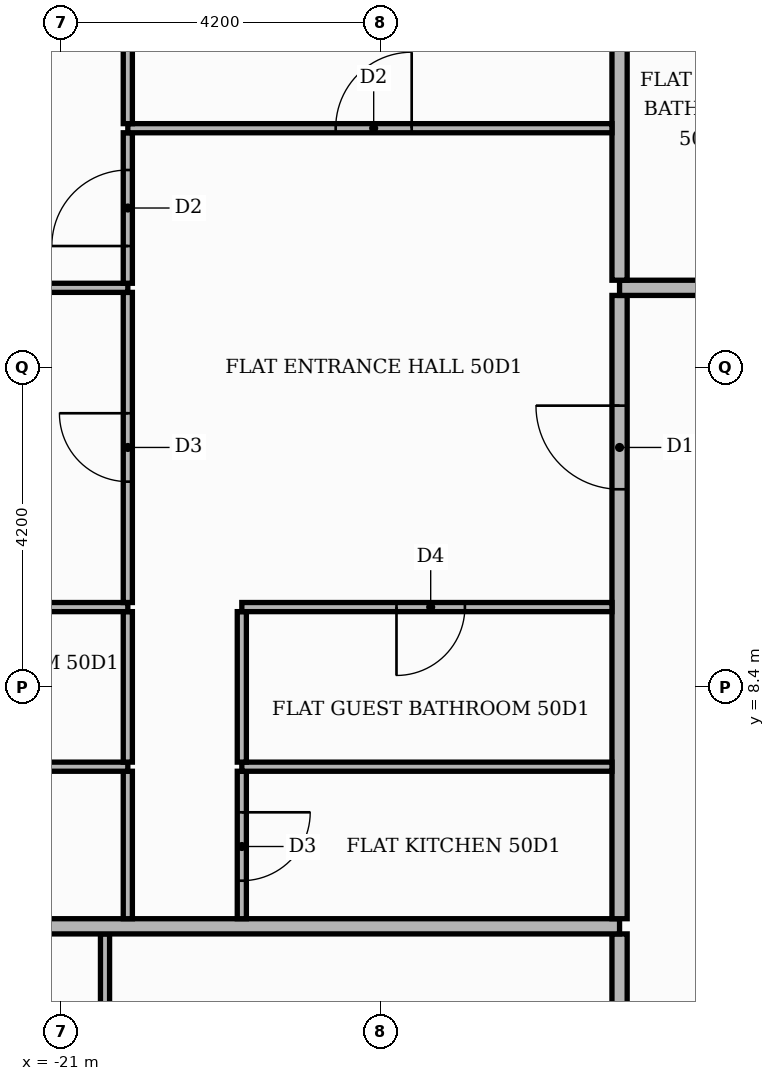
"""IFC4 building model, lengths in metres.
Left out: names, types, materials, properties, quantities, classifications, styles, units other than length and angle.
Written with IfcOpenShell. Run it as: python <this file> out.ifc"""

import sys

from ifc_helpers import new_model, si_unit, direction, frame, frame_2d, origin, place, context, subcontext, project, spatial, rectangle, extrude, element, fill, save


model = new_model("IFC4")
c1 = context("Model", 3, precision=1e-05, world=origin(), true_north=direction((0.0, 1.0)))
c2 = subcontext(c1, "Body", "Model", "MODEL_VIEW")
j1 = project(units=[si_unit("LENGTHUNIT", "METRE"), si_unit("PLANEANGLEUNIT", "RADIAN")], contexts=[c1])
p1 = place(None, origin())
s1 = spatial("IfcSite", under=j1, at=p1, CompositionType="ELEMENT")
p2 = place(p1, origin())
s2 = spatial("IfcBuilding", under=s1, at=p2, CompositionType="ELEMENT")
p3 = place(p2, frame((0.0, 0.0, 211.8)))
s3 = spatial("IfcBuildingStorey", under=s2, at=p3, CompositionType="ELEMENT", Elevation=211.8)
p4 = place(p3, frame((-13.65, -13.55, 0.0), z_axis=(0.0, 0.0, 1.0), x_axis=(0.0, 1.0, 0.0)))
e1 = element("IfcWall", 1, at=p4, inside=s3, PredefinedType="PARTITIONING", context=c2, shape_type="SweptSolid", body=[
    extrude(rectangle(XDim=18.7, YDim=0.2, at=frame_2d((9.35, 0.0))), origin(), (0.0, 0.0, 1.0), 3.48),
])
p5 = place(p4, frame((16.15, 0.0, 0.0)))
e2 = element("IfcOpeningElement", 2, at=p5, cuts=e1, PredefinedType="OPENING", context=c2, shape_type="SweptSolid", body=[
    extrude(rectangle(XDim=1.1, YDim=2.4, at=frame_2d((0.55, 1.2))), frame((0.0, 0.11, 0.0), z_axis=(0.0, -1.0, 0.0), x_axis=(1.0, 0.0, 0.0)), (0.0, 0.0, 1.0), 0.22),
])
p6 = place(p3, frame((-20.42, 1.11, 0.0), z_axis=(0.0, 0.0, 1.0), x_axis=(0.0, 1.0, 0.0)))
e3 = element("IfcWall", 3, at=p6, inside=s3, PredefinedType="PARTITIONING", context=c2, shape_type="SweptSolid", body=[
    extrude(rectangle(XDim=4.04, YDim=0.12, at=frame_2d((2.02, 0.0))), origin(), (0.0, 0.0, 1.0), 3.48),
])
p7 = place(p6, frame((1.54, 0.0, 0.0)))
e4 = element("IfcOpeningElement", 4, at=p7, cuts=e3, PredefinedType="OPENING", context=c2, shape_type="SweptSolid", body=[
    extrude(rectangle(XDim=1.0, YDim=2.1, at=frame_2d((0.5, 1.05))), frame((0.0, 0.07, 0.0), z_axis=(0.0, -1.0, 0.0), x_axis=(1.0, 0.0, 0.0)), (0.0, 0.0, 1.0), 0.14),
])
p8 = place(p3, frame((-25.42, 5.25, 0.0), z_axis=(0.0, 0.0, 1.0), x_axis=(1.0, 0.0, 0.0)))
e5 = element("IfcWall", 5, at=p8, inside=s3, PredefinedType="PARTITIONING", context=c2, shape_type="SweptSolid", body=[
    extrude(rectangle(XDim=11.77, YDim=0.2, at=frame_2d((5.885, 0.0))), origin(), (0.0, 0.0, 1.0), 3.48),
])
p9 = place(p3, frame((-20.12, 5.35, 0.0), z_axis=(0.0, 0.0, 1.0), x_axis=(0.0, 1.0, 0.0)))
e6 = element("IfcWall", 6, at=p9, inside=s3, PredefinedType="PARTITIONING", context=c2, shape_type="SweptSolid", body=[
    extrude(rectangle(XDim=1.94, YDim=0.12, at=frame_2d((0.97, 0.0))), origin(), (0.0, 0.0, 1.0), 3.48),
])
p10 = place(p3, frame((-18.62, 5.35, 0.0), z_axis=(0.0, 0.0, 1.0), x_axis=(0.0, 1.0, 0.0)))
e7 = element("IfcWall", 7, at=p10, inside=s3, PredefinedType="PARTITIONING", context=c2, shape_type="SweptSolid", body=[
    extrude(rectangle(XDim=1.94, YDim=0.12, at=frame_2d((0.97, 0.0))), origin(), (0.0, 0.0, 1.0), 3.48),
])
p11 = place(p10, frame((0.5, 0.0, 0.0)))
e8 = element("IfcOpeningElement", 8, at=p11, cuts=e7, PredefinedType="OPENING", context=c2, shape_type="SweptSolid", body=[
    extrude(rectangle(XDim=0.9, YDim=2.1, at=frame_2d((0.45, 1.05))), frame((0.0, 0.07, 0.0), z_axis=(0.0, -1.0, 0.0), x_axis=(1.0, 0.0, 0.0)), (0.0, 0.0, 1.0), 0.14),
])
p12 = place(p3, frame((-13.65, 5.35, 0.0), z_axis=(0.0, 0.0, 1.0), x_axis=(0.0, 1.0, 0.0)))
e9 = element("IfcWall", 9, at=p12, inside=s3, PredefinedType="PARTITIONING", context=c2, shape_type="SweptSolid", body=[
    extrude(rectangle(XDim=8.2, YDim=0.2, at=frame_2d((4.1, 0.0))), origin(), (0.0, 0.0, 1.0), 3.48),
])
p13 = place(p12, frame((5.65, 0.0, 0.0)))
e10 = element("IfcOpeningElement", 10, at=p13, cuts=e9, PredefinedType="OPENING", context=c2, shape_type="SweptSolid", body=[
    extrude(rectangle(XDim=1.1, YDim=2.4, at=frame_2d((0.55, 1.2))), frame((0.0, 0.11, 0.0), z_axis=(0.0, -1.0, 0.0), x_axis=(1.0, 0.0, 0.0)), (0.0, 0.0, 1.0), 0.22),
])
p14 = place(p3, frame((-25.42, 7.35, 0.0), z_axis=(0.0, 0.0, 1.0), x_axis=(1.0, 0.0, 0.0)))
e11 = element("IfcWall", 11, at=p14, inside=s3, PredefinedType="PARTITIONING", context=c2, shape_type="SweptSolid", body=[
    extrude(rectangle(XDim=5.3, YDim=0.12, at=frame_2d((2.65, 0.0))), origin(), (0.0, 0.0, 1.0), 3.48),
])
p15 = place(p14, frame((2.05, 0.0, 0.0)))
e12 = element("IfcOpeningElement", 12, at=p15, cuts=e11, PredefinedType="OPENING", context=c2, shape_type="SweptSolid", body=[
    extrude(rectangle(XDim=0.9, YDim=2.1, at=frame_2d((0.45, 1.05))), frame((0.0, 0.07, 0.0), z_axis=(0.0, -1.0, 0.0), x_axis=(1.0, 0.0, 0.0)), (0.0, 0.0, 1.0), 0.14),
])
p16 = place(p3, frame((-18.62, 7.35, 0.0), z_axis=(0.0, 0.0, 1.0), x_axis=(1.0, 0.0, 0.0)))
e13 = element("IfcWall", 13, at=p16, inside=s3, PredefinedType="PARTITIONING", context=c2, shape_type="SweptSolid", body=[
    extrude(rectangle(XDim=4.87, YDim=0.12, at=frame_2d((2.435, 0.0))), origin(), (0.0, 0.0, 1.0), 3.48),
])
for number, where, z_axis, x_axis in (
    (14, (-20.12, 7.41, 0.0), (0.0, 0.0, 1.0), (0.0, 1.0, 0.0)),
    (15, (-18.62, 7.41, 0.0), (0.0, 0.0, 1.0), (0.0, 1.0, 0.0)),
):
    element("IfcWall", number, at=place(p3, frame(where, z_axis=z_axis, x_axis=x_axis)), inside=s3, PredefinedType="PARTITIONING", context=c2, shape_type="SweptSolid", body=[
        extrude(rectangle(XDim=1.98, YDim=0.12, at=frame_2d((0.99, 0.0))), origin(), (0.0, 0.0, 1.0), 3.48),
    ])
p17 = place(p3, frame((-25.42, 9.45, 0.0), z_axis=(0.0, 0.0, 1.0), x_axis=(1.0, 0.0, 0.0)))
e16 = element("IfcWall", 16, at=p17, inside=s3, PredefinedType="PARTITIONING", context=c2, shape_type="SweptSolid", body=[
    extrude(rectangle(XDim=5.3, YDim=0.12, at=frame_2d((2.65, 0.0))), origin(), (0.0, 0.0, 1.0), 3.48),
])
p18 = place(p17, frame((2.05, 0.0, 0.0)))
e17 = element("IfcOpeningElement", 17, at=p18, cuts=e16, PredefinedType="OPENING", context=c2, shape_type="SweptSolid", body=[
    extrude(rectangle(XDim=0.9, YDim=2.1, at=frame_2d((0.45, 1.05))), frame((0.0, 0.07, 0.0), z_axis=(0.0, -1.0, 0.0), x_axis=(1.0, 0.0, 0.0)), (0.0, 0.0, 1.0), 0.14),
])
p19 = place(p3, frame((-18.62, 9.45, 0.0), z_axis=(0.0, 0.0, 1.0), x_axis=(1.0, 0.0, 0.0)))
e18 = element("IfcWall", 18, at=p19, inside=s3, PredefinedType="PARTITIONING", context=c2, shape_type="SweptSolid", body=[
    extrude(rectangle(XDim=4.87, YDim=0.12, at=frame_2d((2.435, 0.0))), origin(), (0.0, 0.0, 1.0), 3.48),
])
p20 = place(p19, frame((2.035, 0.0, 0.0)))
e19 = element("IfcOpeningElement", 19, at=p20, cuts=e18, PredefinedType="OPENING", context=c2, shape_type="SweptSolid", body=[
    extrude(rectangle(XDim=0.9, YDim=2.1, at=frame_2d((0.45, 1.05))), frame((0.0, 0.07, 0.0), z_axis=(0.0, -1.0, 0.0), x_axis=(1.0, 0.0, 0.0)), (0.0, 0.0, 1.0), 0.14),
])
p21 = place(p3, frame((-20.12, 9.51, 0.0), z_axis=(0.0, 0.0, 1.0), x_axis=(0.0, 1.0, 0.0)))
e20 = element("IfcWall", 20, at=p21, inside=s3, PredefinedType="PARTITIONING", context=c2, shape_type="SweptSolid", body=[
    extrude(rectangle(XDim=4.08, YDim=0.12, at=frame_2d((2.04, 0.0))), origin(), (0.0, 0.0, 1.0), 3.48),
])
p22 = place(p21, frame((1.59, 0.0, 0.0)))
e21 = element("IfcOpeningElement", 21, at=p22, cuts=e20, PredefinedType="OPENING", context=c2, shape_type="SweptSolid", body=[
    extrude(rectangle(XDim=0.9, YDim=2.1, at=frame_2d((0.45, 1.05))), frame((0.0, 0.07, 0.0), z_axis=(0.0, -1.0, 0.0), x_axis=(1.0, 0.0, 0.0)), (0.0, 0.0, 1.0), 0.14),
])
p23 = place(p3, frame((-25.42, 13.65, 0.0), z_axis=(0.0, 0.0, 1.0), x_axis=(1.0, 0.0, 0.0)))
e22 = element("IfcWall", 22, at=p23, inside=s3, PredefinedType="PARTITIONING", context=c2, shape_type="SweptSolid", body=[
    extrude(rectangle(XDim=5.3, YDim=0.12, at=frame_2d((2.65, 0.0))), origin(), (0.0, 0.0, 1.0), 3.48),
])
p24 = place(p3, frame((-13.65, 13.65, 0.0), z_axis=(0.0, 0.0, 1.0), x_axis=(1.0, 0.0, 0.0)))
e23 = element("IfcWall", 23, at=p24, inside=s3, PredefinedType="PARTITIONING", context=c2, shape_type="SweptSolid", body=[
    extrude(rectangle(XDim=39.07, YDim=0.2, at=frame_2d((19.535, 0.0))), origin(), (0.0, 0.0, 1.0), 3.48),
])
p25 = place(p24, frame((23.6, 0.0, 0.0)))
e24 = element("IfcOpeningElement", 24, at=p25, cuts=e23, PredefinedType="OPENING", context=c2, shape_type="SweptSolid", body=[
    extrude(rectangle(XDim=1.1, YDim=2.4, at=frame_2d((0.55, 1.2))), frame((0.0, 0.11, 0.0), z_axis=(0.0, -1.0, 0.0), x_axis=(1.0, 0.0, 0.0)), (0.0, 0.0, 1.0), 0.22),
])
p26 = place(p3, frame((-20.12, 13.71, 0.0), z_axis=(0.0, 0.0, 1.0), x_axis=(0.0, 1.0, 0.0)))
e25 = element("IfcWall", 25, at=p26, inside=s3, PredefinedType="PARTITIONING", context=c2, shape_type="SweptSolid", body=[
    extrude(rectangle(XDim=1.98, YDim=0.12, at=frame_2d((0.99, 0.0))), origin(), (0.0, 0.0, 1.0), 3.48),
])
p27 = place(p26, frame((0.49, 0.0, 0.0)))
e26 = element("IfcOpeningElement", 26, at=p27, cuts=e25, PredefinedType="OPENING", context=c2, shape_type="SweptSolid", body=[
    extrude(rectangle(XDim=1.0, YDim=2.1, at=frame_2d((0.5, 1.05))), frame((0.0, 0.07, 0.0), z_axis=(0.0, -1.0, 0.0), x_axis=(1.0, 0.0, 0.0)), (0.0, 0.0, 1.0), 0.14),
])
p28 = place(p3, frame((-13.65, 13.75, 0.0), z_axis=(0.0, 0.0, 1.0), x_axis=(0.0, 1.0, 0.0)))
e27 = element("IfcWall", 27, at=p28, inside=s3, PredefinedType="PARTITIONING", context=c2, shape_type="SweptSolid", body=[
    extrude(rectangle(XDim=11.67, YDim=0.2, at=frame_2d((5.835, 0.0))), origin(), (0.0, 0.0, 1.0), 3.48),
])
p29 = place(p3, frame((-20.12, 15.75, 0.0), z_axis=(0.0, 0.0, 1.0), x_axis=(1.0, 0.0, 0.0)))
e28 = element("IfcWall", 28, at=p29, inside=s3, PredefinedType="PARTITIONING", context=c2, shape_type="SweptSolid", body=[
    extrude(rectangle(XDim=6.37, YDim=0.12, at=frame_2d((3.185, 0.0))), origin(), (0.0, 0.0, 1.0), 3.48),
])
p30 = place(p29, frame((2.735, 0.0, 0.0)))
e29 = element("IfcOpeningElement", 29, at=p30, cuts=e28, PredefinedType="OPENING", context=c2, shape_type="SweptSolid", body=[
    extrude(rectangle(XDim=1.0, YDim=2.1, at=frame_2d((0.5, 1.05))), frame((0.0, 0.07, 0.0), z_axis=(0.0, -1.0, 0.0), x_axis=(1.0, 0.0, 0.0)), (0.0, 0.0, 1.0), 0.14),
])
p31 = place(p3, frame((-20.12, 15.81, 0.0), z_axis=(0.0, 0.0, 1.0), x_axis=(0.0, 1.0, 0.0)))
e30 = element("IfcWall", 30, at=p31, inside=s3, PredefinedType="PARTITIONING", context=c2, shape_type="SweptSolid", body=[
    extrude(rectangle(XDim=9.61, YDim=0.12, at=frame_2d((4.805, 0.0))), origin(), (0.0, 0.0, 1.0), 3.48),
])
p32 = place(p13, origin())
e31 = element("IfcDoor", 31, at=p32, inside=s3, OperationType="SINGLE_SWING_RIGHT", PredefinedType="DOOR", context=c2, shape_type="SweptSolid", body=[
    extrude(rectangle(XDim=1.1, YDim=2.4, at=frame_2d((0.55, 1.2))), frame((0.0, 0.025, 0.0), z_axis=(0.0, -1.0, 0.0), x_axis=(1.0, 0.0, 0.0)), (0.0, 0.0, 1.0), 0.05),
])
fill(e10, e31)
p33 = place(p30, origin())
e32 = element("IfcDoor", 32, at=p33, inside=s3, OperationType="SINGLE_SWING_RIGHT", PredefinedType="DOOR", context=c2, shape_type="SweptSolid", body=[
    extrude(rectangle(XDim=1.0, YDim=2.1, at=frame_2d((0.5, 1.05))), frame((0.0, 0.025, 0.0), z_axis=(0.0, -1.0, 0.0), x_axis=(1.0, 0.0, 0.0)), (0.0, 0.0, 1.0), 0.05),
])
fill(e29, e32)
p34 = place(p20, frame((0.9, 0.0, 0.0), z_axis=(0.0, 0.0, 1.0), x_axis=(-1.0, 0.0, 0.0)))
e33 = element("IfcDoor", 33, at=p34, inside=s3, OperationType="SINGLE_SWING_LEFT", PredefinedType="DOOR", context=c2, shape_type="SweptSolid", body=[
    extrude(rectangle(XDim=0.9, YDim=2.1, at=frame_2d((0.45, 1.05))), frame((0.0, 0.025, 0.0), z_axis=(0.0, -1.0, 0.0), x_axis=(1.0, 0.0, 0.0)), (0.0, 0.0, 1.0), 0.05),
])
fill(e19, e33)
p35 = place(p11, frame((0.9, 0.0, 0.0), z_axis=(0.0, 0.0, 1.0), x_axis=(-1.0, 0.0, 0.0)))
e34 = element("IfcDoor", 34, at=p35, inside=s3, OperationType="SINGLE_SWING_RIGHT", PredefinedType="DOOR", context=c2, shape_type="SweptSolid", body=[
    extrude(rectangle(XDim=0.9, YDim=2.1, at=frame_2d((0.45, 1.05))), frame((0.0, 0.025, 0.0), z_axis=(0.0, -1.0, 0.0), x_axis=(1.0, 0.0, 0.0)), (0.0, 0.0, 1.0), 0.05),
])
fill(e8, e34)
p36 = place(p27, origin())
e35 = element("IfcDoor", 35, at=p36, inside=s3, OperationType="SINGLE_SWING_LEFT", PredefinedType="DOOR", context=c2, shape_type="SweptSolid", body=[
    extrude(rectangle(XDim=1.0, YDim=2.1, at=frame_2d((0.5, 1.05))), frame((0.0, 0.025, 0.0), z_axis=(0.0, -1.0, 0.0), x_axis=(1.0, 0.0, 0.0)), (0.0, 0.0, 1.0), 0.05),
])
fill(e26, e35)
p37 = place(p22, origin())
e36 = element("IfcDoor", 36, at=p37, inside=s3, OperationType="SINGLE_SWING_RIGHT", PredefinedType="DOOR", context=c2, shape_type="SweptSolid", body=[
    extrude(rectangle(XDim=0.9, YDim=2.1, at=frame_2d((0.45, 1.05))), frame((0.0, 0.025, 0.0), z_axis=(0.0, -1.0, 0.0), x_axis=(1.0, 0.0, 0.0)), (0.0, 0.0, 1.0), 0.05),
])
fill(e21, e36)
save(model, sys.argv[1])
